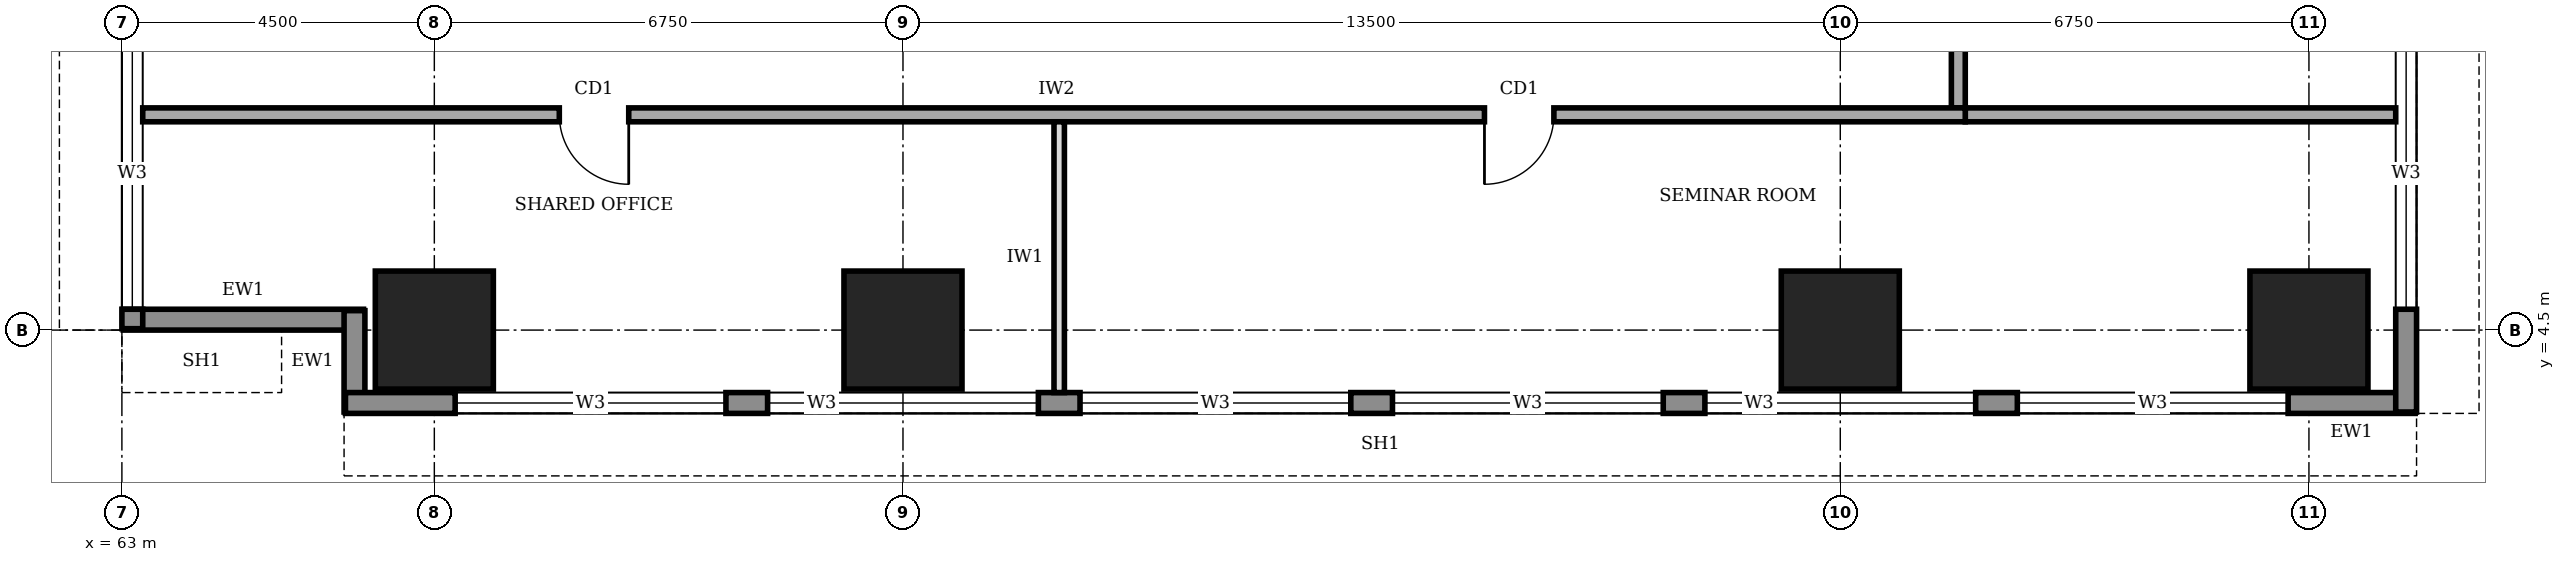
"""IFC4 building model, lengths in metres.
Left out: names, types, materials, properties, quantities, classifications, styles, units other than length and angle.
Written with IfcOpenShell. Run it as: python <this file> out.ifc"""

import sys

from ifc_helpers import new_model, si_unit, direction, frame, frame_2d, origin, origin_2d, place, context, subcontext, project, spatial, rectangle, extrude, element, fill, save


model = new_model("IFC4")
c1 = context("Model", 3, precision=1e-05, world=origin(), true_north=direction((0.0, 1.0)))
c2 = subcontext(c1, "Body", "Model", "MODEL_VIEW")
j1 = project(units=[si_unit("LENGTHUNIT", "METRE"), si_unit("PLANEANGLEUNIT", "RADIAN")], contexts=[c1])
p1 = place(None, origin())
s1 = spatial("IfcSite", under=j1, at=p1, CompositionType="ELEMENT")
p2 = place(p1, origin())
s2 = spatial("IfcBuilding", under=s1, at=p2, CompositionType="ELEMENT")
p3 = place(p2, frame((0.0, 0.0, 93.0)))
s3 = spatial("IfcBuildingStorey", under=s2, at=p3, CompositionType="ELEMENT", Elevation=93.0)
for number, where, z_axis, x_axis in (
    (1, (67.5, 4.5, 0.0), (0.0, 0.0, 1.0), (1.0, 0.0, 0.0)),
    (2, (74.25, 4.5, 0.0), (0.0, 0.0, 1.0), (1.0, 0.0, 0.0)),
    (3, (87.75, 4.5, 0.0), (0.0, 0.0, 1.0), (1.0, 0.0, 0.0)),
    (4, (94.5, 4.5, 0.0), (0.0, 0.0, 1.0), (1.0, 0.0, 0.0)),
):
    element("IfcColumn", number, at=place(p3, frame(where, z_axis=z_axis, x_axis=x_axis)), inside=s3, PredefinedType="COLUMN", context=c2, shape_type="SweptSolid", body=[
        extrude(rectangle(XDim=1.7, YDim=1.7, at=origin_2d()), origin(), (0.0, 0.0, 1.0), 4.0),
    ])
p4 = place(p3, frame((63.02, 4.65, 0.0), z_axis=(0.0, 0.0, 1.0), x_axis=(1.0, 0.0, 0.0)))
e5 = element("IfcWall", 5, at=p4, inside=s3, PredefinedType="STANDARD", context=c2, shape_type="SweptSolid", body=[
    extrude(rectangle(XDim=3.46, YDim=0.3, at=frame_2d((1.73, 0.0))), origin(), (0.0, 0.0, 1.0), 2.85),
])
p5 = place(p3, frame((66.35, 4.78, 0.0), z_axis=(0.0, 0.0, 1.0), x_axis=(0.0, -1.0, 0.0)))
e6 = element("IfcWall", 6, at=p5, inside=s3, PredefinedType="STANDARD", context=c2, shape_type="SweptSolid", body=[
    extrude(rectangle(XDim=1.46, YDim=0.3, at=frame_2d((0.73, 0.0))), origin(), (0.0, 0.0, 1.0), 3.75),
])
p6 = place(p3, frame((66.22, 3.45, 0.0), z_axis=(0.0, 0.0, 1.0), x_axis=(1.0, 0.0, 0.0)))
e7 = element("IfcWall", 7, at=p6, inside=s3, PredefinedType="STANDARD", context=c2, shape_type="SweptSolid", body=[
    extrude(rectangle(XDim=29.81, YDim=0.3, at=frame_2d((14.905, 0.0))), origin(), (0.0, 0.0, 1.0), 3.75),
])
p7 = place(p6, frame((1.58, 0.0, 0.95)))
e8 = element("IfcOpeningElement", 8, at=p7, cuts=e7, PredefinedType="OPENING", context=c2, shape_type="SweptSolid", body=[
    extrude(rectangle(XDim=3.9, YDim=1.8, at=frame_2d((1.95, 0.9))), frame((0.0, 0.16, 0.0), z_axis=(0.0, -1.0, 0.0), x_axis=(1.0, 0.0, 0.0)), (0.0, 0.0, 1.0), 0.32),
])
p8 = place(p6, frame((6.08, 0.0, 0.95)))
e9 = element("IfcOpeningElement", 9, at=p8, cuts=e7, PredefinedType="OPENING", context=c2, shape_type="SweptSolid", body=[
    extrude(rectangle(XDim=3.9, YDim=1.8, at=frame_2d((1.95, 0.9))), frame((0.0, 0.16, 0.0), z_axis=(0.0, -1.0, 0.0), x_axis=(1.0, 0.0, 0.0)), (0.0, 0.0, 1.0), 0.32),
])
p9 = place(p6, frame((10.58, 0.0, 0.95)))
e10 = element("IfcOpeningElement", 10, at=p9, cuts=e7, PredefinedType="OPENING", context=c2, shape_type="SweptSolid", body=[
    extrude(rectangle(XDim=3.9, YDim=1.8, at=frame_2d((1.95, 0.9))), frame((0.0, 0.16, 0.0), z_axis=(0.0, -1.0, 0.0), x_axis=(1.0, 0.0, 0.0)), (0.0, 0.0, 1.0), 0.32),
])
p10 = place(p6, frame((15.08, 0.0, 0.95)))
e11 = element("IfcOpeningElement", 11, at=p10, cuts=e7, PredefinedType="OPENING", context=c2, shape_type="SweptSolid", body=[
    extrude(rectangle(XDim=3.9, YDim=1.8, at=frame_2d((1.95, 0.9))), frame((0.0, 0.16, 0.0), z_axis=(0.0, -1.0, 0.0), x_axis=(1.0, 0.0, 0.0)), (0.0, 0.0, 1.0), 0.32),
])
p11 = place(p6, frame((19.58, 0.0, 0.95)))
e12 = element("IfcOpeningElement", 12, at=p11, cuts=e7, PredefinedType="OPENING", context=c2, shape_type="SweptSolid", body=[
    extrude(rectangle(XDim=3.9, YDim=1.8, at=frame_2d((1.95, 0.9))), frame((0.0, 0.16, 0.0), z_axis=(0.0, -1.0, 0.0), x_axis=(1.0, 0.0, 0.0)), (0.0, 0.0, 1.0), 0.32),
])
p12 = place(p6, frame((24.08, 0.0, 0.95)))
e13 = element("IfcOpeningElement", 13, at=p12, cuts=e7, PredefinedType="OPENING", context=c2, shape_type="SweptSolid", body=[
    extrude(rectangle(XDim=3.9, YDim=1.8, at=frame_2d((1.95, 0.9))), frame((0.0, 0.16, 0.0), z_axis=(0.0, -1.0, 0.0), x_axis=(1.0, 0.0, 0.0)), (0.0, 0.0, 1.0), 0.32),
])
p13 = place(p3, frame((95.9, 3.32, 0.0), z_axis=(0.0, 0.0, 1.0), x_axis=(0.0, 1.0, 0.0)))
e14 = element("IfcWall", 14, at=p13, inside=s3, PredefinedType="STANDARD", context=c2, shape_type="SweptSolid", body=[
    extrude(rectangle(XDim=33.96, YDim=0.3, at=frame_2d((16.98, 0.0))), origin(), (0.0, 0.0, 1.0), 3.75),
])
p14 = place(p13, frame((1.48, 0.0, 0.95)))
e15 = element("IfcOpeningElement", 15, at=p14, cuts=e14, PredefinedType="OPENING", context=c2, shape_type="SweptSolid", body=[
    extrude(rectangle(XDim=3.9, YDim=1.8, at=frame_2d((1.95, 0.9))), frame((0.0, 0.16, 0.0), z_axis=(0.0, -1.0, 0.0), x_axis=(1.0, 0.0, 0.0)), (0.0, 0.0, 1.0), 0.32),
])
p15 = place(p13, frame((5.98, 0.0, 0.95)))
e16 = element("IfcOpeningElement", 16, at=p15, cuts=e14, PredefinedType="OPENING", context=c2, shape_type="SweptSolid", body=[
    extrude(rectangle(XDim=3.9, YDim=1.8, at=frame_2d((1.95, 0.9))), frame((0.0, 0.16, 0.0), z_axis=(0.0, -1.0, 0.0), x_axis=(1.0, 0.0, 0.0)), (0.0, 0.0, 1.0), 0.32),
])
p16 = place(p13, frame((10.48, 0.0, 0.95)))
e17 = element("IfcOpeningElement", 17, at=p16, cuts=e14, PredefinedType="OPENING", context=c2, shape_type="SweptSolid", body=[
    extrude(rectangle(XDim=3.9, YDim=1.8, at=frame_2d((1.95, 0.9))), frame((0.0, 0.16, 0.0), z_axis=(0.0, -1.0, 0.0), x_axis=(1.0, 0.0, 0.0)), (0.0, 0.0, 1.0), 0.32),
])
p17 = place(p13, frame((14.98, 0.0, 0.95)))
e18 = element("IfcOpeningElement", 18, at=p17, cuts=e14, PredefinedType="OPENING", context=c2, shape_type="SweptSolid", body=[
    extrude(rectangle(XDim=3.9, YDim=1.8, at=frame_2d((1.95, 0.9))), frame((0.0, 0.16, 0.0), z_axis=(0.0, -1.0, 0.0), x_axis=(1.0, 0.0, 0.0)), (0.0, 0.0, 1.0), 0.32),
])
p18 = place(p13, frame((19.48, 0.0, 0.95)))
e19 = element("IfcOpeningElement", 19, at=p18, cuts=e14, PredefinedType="OPENING", context=c2, shape_type="SweptSolid", body=[
    extrude(rectangle(XDim=3.9, YDim=1.8, at=frame_2d((1.95, 0.9))), frame((0.0, 0.16, 0.0), z_axis=(0.0, -1.0, 0.0), x_axis=(1.0, 0.0, 0.0)), (0.0, 0.0, 1.0), 0.32),
])
p19 = place(p13, frame((23.98, 0.0, 0.95)))
e20 = element("IfcOpeningElement", 20, at=p19, cuts=e14, PredefinedType="OPENING", context=c2, shape_type="SweptSolid", body=[
    extrude(rectangle(XDim=3.9, YDim=1.8, at=frame_2d((1.95, 0.9))), frame((0.0, 0.16, 0.0), z_axis=(0.0, -1.0, 0.0), x_axis=(1.0, 0.0, 0.0)), (0.0, 0.0, 1.0), 0.32),
])
p20 = place(p13, frame((28.48, 0.0, 0.95)))
e21 = element("IfcOpeningElement", 21, at=p20, cuts=e14, PredefinedType="OPENING", context=c2, shape_type="SweptSolid", body=[
    extrude(rectangle(XDim=3.9, YDim=1.8, at=frame_2d((1.95, 0.9))), frame((0.0, 0.16, 0.0), z_axis=(0.0, -1.0, 0.0), x_axis=(1.0, 0.0, 0.0)), (0.0, 0.0, 1.0), 0.32),
])
p21 = place(p3, frame((63.15, 35.98, 0.0), z_axis=(0.0, 0.0, 1.0), x_axis=(0.0, -1.0, 0.0)))
e22 = element("IfcWall", 22, at=p21, inside=s3, PredefinedType="STANDARD", context=c2, shape_type="SweptSolid", body=[
    extrude(rectangle(XDim=31.46, YDim=0.3, at=frame_2d((15.73, 0.0))), origin(), (0.0, 0.0, 1.0), 3.75),
])
p22 = place(p21, frame((27.28, 0.0, 0.95)))
e23 = element("IfcOpeningElement", 23, at=p22, cuts=e22, PredefinedType="OPENING", context=c2, shape_type="SweptSolid", body=[
    extrude(rectangle(XDim=3.9, YDim=1.8, at=frame_2d((1.95, 0.9))), frame((0.0, 0.16, 0.0), z_axis=(0.0, -1.0, 0.0), x_axis=(1.0, 0.0, 0.0)), (0.0, 0.0, 1.0), 0.32),
])
p23 = place(p21, frame((22.78, 0.0, 0.95)))
e24 = element("IfcOpeningElement", 24, at=p23, cuts=e22, PredefinedType="OPENING", context=c2, shape_type="SweptSolid", body=[
    extrude(rectangle(XDim=3.9, YDim=1.8, at=frame_2d((1.95, 0.9))), frame((0.0, 0.16, 0.0), z_axis=(0.0, -1.0, 0.0), x_axis=(1.0, 0.0, 0.0)), (0.0, 0.0, 1.0), 0.32),
])
p24 = place(p21, frame((18.28, 0.0, 0.95)))
e25 = element("IfcOpeningElement", 25, at=p24, cuts=e22, PredefinedType="OPENING", context=c2, shape_type="SweptSolid", body=[
    extrude(rectangle(XDim=3.9, YDim=1.8, at=frame_2d((1.95, 0.9))), frame((0.0, 0.16, 0.0), z_axis=(0.0, -1.0, 0.0), x_axis=(1.0, 0.0, 0.0)), (0.0, 0.0, 1.0), 0.32),
])
p25 = place(p21, frame((13.78, 0.0, 0.95)))
e26 = element("IfcOpeningElement", 26, at=p25, cuts=e22, PredefinedType="OPENING", context=c2, shape_type="SweptSolid", body=[
    extrude(rectangle(XDim=3.9, YDim=1.8, at=frame_2d((1.95, 0.9))), frame((0.0, 0.16, 0.0), z_axis=(0.0, -1.0, 0.0), x_axis=(1.0, 0.0, 0.0)), (0.0, 0.0, 1.0), 0.32),
])
p26 = place(p21, frame((9.28, 0.0, 0.95)))
e27 = element("IfcOpeningElement", 27, at=p26, cuts=e22, PredefinedType="OPENING", context=c2, shape_type="SweptSolid", body=[
    extrude(rectangle(XDim=3.9, YDim=1.8, at=frame_2d((1.95, 0.9))), frame((0.0, 0.16, 0.0), z_axis=(0.0, -1.0, 0.0), x_axis=(1.0, 0.0, 0.0)), (0.0, 0.0, 1.0), 0.32),
])
p27 = place(p21, frame((4.78, 0.0, 0.95)))
e28 = element("IfcOpeningElement", 28, at=p27, cuts=e22, PredefinedType="OPENING", context=c2, shape_type="SweptSolid", body=[
    extrude(rectangle(XDim=3.9, YDim=1.8, at=frame_2d((1.95, 0.9))), frame((0.0, 0.16, 0.0), z_axis=(0.0, -1.0, 0.0), x_axis=(1.0, 0.0, 0.0)), (0.0, 0.0, 1.0), 0.32),
])
p28 = place(p3, frame((63.3, 7.6, 0.0), z_axis=(0.0, 0.0, 1.0), x_axis=(1.0, 0.0, 0.0)))
e29 = element("IfcWall", 29, at=p28, inside=s3, PredefinedType="SOLIDWALL", context=c2, shape_type="SweptSolid", body=[
    extrude(rectangle(XDim=26.25, YDim=0.2, at=frame_2d((13.125, 0.0))), origin(), (0.0, 0.0, 1.0), 3.75),
])
p29 = place(p28, frame((6.0, 0.0, 0.0)))
e30 = element("IfcOpeningElement", 30, at=p29, cuts=e29, PredefinedType="OPENING", context=c2, shape_type="SweptSolid", body=[
    extrude(rectangle(XDim=1.0, YDim=2.1, at=frame_2d((0.5, 1.05))), frame((0.0, 0.11, 0.0), z_axis=(0.0, -1.0, 0.0), x_axis=(1.0, 0.0, 0.0)), (0.0, 0.0, 1.0), 0.22),
])
p30 = place(p28, frame((19.325, 0.0, 0.0)))
e31 = element("IfcOpeningElement", 31, at=p30, cuts=e29, PredefinedType="OPENING", context=c2, shape_type="SweptSolid", body=[
    extrude(rectangle(XDim=1.0, YDim=2.1, at=frame_2d((0.5, 1.05))), frame((0.0, 0.11, 0.0), z_axis=(0.0, -1.0, 0.0), x_axis=(1.0, 0.0, 0.0)), (0.0, 0.0, 1.0), 0.22),
])
p31 = place(p3, frame((89.45, 7.7, 0.0), z_axis=(0.0, 0.0, 1.0), x_axis=(0.0, 1.0, 0.0)))
e32 = element("IfcWall", 32, at=p31, inside=s3, PredefinedType="SOLIDWALL", context=c2, shape_type="SweptSolid", body=[
    extrude(rectangle(XDim=25.3, YDim=0.2, at=frame_2d((12.65, 0.0))), origin(), (0.0, 0.0, 1.0), 3.75),
])
p32 = place(p31, frame((2.3, 0.0, 0.0)))
e33 = element("IfcOpeningElement", 33, at=p32, cuts=e32, PredefinedType="OPENING", context=c2, shape_type="SweptSolid", body=[
    extrude(rectangle(XDim=1.0, YDim=2.1, at=frame_2d((0.5, 1.05))), frame((0.0, 0.11, 0.0), z_axis=(0.0, -1.0, 0.0), x_axis=(1.0, 0.0, 0.0)), (0.0, 0.0, 1.0), 0.22),
])
p33 = place(p31, frame((7.25, 0.0, 0.0)))
e34 = element("IfcOpeningElement", 34, at=p33, cuts=e32, PredefinedType="OPENING", context=c2, shape_type="SweptSolid", body=[
    extrude(rectangle(XDim=0.9, YDim=2.1, at=frame_2d((0.45, 1.05))), frame((0.0, 0.11, 0.0), z_axis=(0.0, -1.0, 0.0), x_axis=(1.0, 0.0, 0.0)), (0.0, 0.0, 1.0), 0.22),
])
p34 = place(p31, frame((10.25, 0.0, 0.0)))
e35 = element("IfcOpeningElement", 35, at=p34, cuts=e32, PredefinedType="OPENING", context=c2, shape_type="SweptSolid", body=[
    extrude(rectangle(XDim=0.9, YDim=2.1, at=frame_2d((0.45, 1.05))), frame((0.0, 0.11, 0.0), z_axis=(0.0, -1.0, 0.0), x_axis=(1.0, 0.0, 0.0)), (0.0, 0.0, 1.0), 0.22),
])
p35 = place(p31, frame((15.1, 0.0, 0.0)))
e36 = element("IfcOpeningElement", 36, at=p35, cuts=e32, PredefinedType="OPENING", context=c2, shape_type="SweptSolid", body=[
    extrude(rectangle(XDim=0.9, YDim=2.1, at=frame_2d((0.45, 1.05))), frame((0.0, 0.11, 0.0), z_axis=(0.0, -1.0, 0.0), x_axis=(1.0, 0.0, 0.0)), (0.0, 0.0, 1.0), 0.22),
])
p36 = place(p31, frame((17.8, 0.0, 0.0)))
e37 = element("IfcOpeningElement", 37, at=p36, cuts=e32, PredefinedType="OPENING", context=c2, shape_type="SweptSolid", body=[
    extrude(rectangle(XDim=1.0, YDim=2.1, at=frame_2d((0.5, 1.05))), frame((0.0, 0.11, 0.0), z_axis=(0.0, -1.0, 0.0), x_axis=(1.0, 0.0, 0.0)), (0.0, 0.0, 1.0), 0.22),
])
p37 = place(p31, frame((12.3, 0.0, 0.0)))
e38 = element("IfcOpeningElement", 38, at=p37, cuts=e32, PredefinedType="OPENING", context=c2, shape_type="SweptSolid", body=[
    extrude(rectangle(XDim=1.0, YDim=2.1, at=frame_2d((0.5, 1.05))), frame((0.0, 0.11, 0.0), z_axis=(0.0, -1.0, 0.0), x_axis=(1.0, 0.0, 0.0)), (0.0, 0.0, 1.0), 0.22),
])
p38 = place(p31, frame((21.8, 0.0, 0.0)))
e39 = element("IfcOpeningElement", 39, at=p38, cuts=e32, PredefinedType="OPENING", context=c2, shape_type="SweptSolid", body=[
    extrude(rectangle(XDim=1.0, YDim=2.1, at=frame_2d((0.5, 1.05))), frame((0.0, 0.11, 0.0), z_axis=(0.0, -1.0, 0.0), x_axis=(1.0, 0.0, 0.0)), (0.0, 0.0, 1.0), 0.22),
])
p39 = place(p3, frame((89.55, 7.6, 0.0), z_axis=(0.0, 0.0, 1.0), x_axis=(1.0, 0.0, 0.0)))
e40 = element("IfcWall", 40, at=p39, inside=s3, PredefinedType="SOLIDWALL", context=c2, shape_type="SweptSolid", body=[
    extrude(rectangle(XDim=6.2, YDim=0.2, at=frame_2d((3.1, 0.0))), origin(), (0.0, 0.0, 1.0), 3.75),
])
p40 = place(p3, frame((76.5, 3.6, 0.0), z_axis=(0.0, 0.0, 1.0), x_axis=(0.0, 1.0, 0.0)))
e41 = element("IfcWall", 41, at=p40, inside=s3, PredefinedType="PARTITIONING", context=c2, shape_type="SweptSolid", body=[
    extrude(rectangle(XDim=3.9, YDim=0.15, at=frame_2d((1.95, 0.0))), origin(), (0.0, 0.0, 1.0), 3.75),
])
p41 = place(p7, origin())
e42 = element("IfcWindow", 42, at=p41, inside=s3, PartitioningType="SINGLE_PANEL", PredefinedType="WINDOW", context=c2, shape_type="SweptSolid", body=[
    extrude(rectangle(XDim=3.9, YDim=1.8, at=frame_2d((1.95, 0.9))), frame((0.0, 0.03, 0.0), z_axis=(0.0, -1.0, 0.0), x_axis=(1.0, 0.0, 0.0)), (0.0, 0.0, 1.0), 0.06),
])
fill(e8, e42)
p42 = place(p8, origin())
e43 = element("IfcWindow", 43, at=p42, inside=s3, PartitioningType="SINGLE_PANEL", PredefinedType="WINDOW", context=c2, shape_type="SweptSolid", body=[
    extrude(rectangle(XDim=3.9, YDim=1.8, at=frame_2d((1.95, 0.9))), frame((0.0, 0.03, 0.0), z_axis=(0.0, -1.0, 0.0), x_axis=(1.0, 0.0, 0.0)), (0.0, 0.0, 1.0), 0.06),
])
fill(e9, e43)
p43 = place(p9, origin())
e44 = element("IfcWindow", 44, at=p43, inside=s3, PartitioningType="SINGLE_PANEL", PredefinedType="WINDOW", context=c2, shape_type="SweptSolid", body=[
    extrude(rectangle(XDim=3.9, YDim=1.8, at=frame_2d((1.95, 0.9))), frame((0.0, 0.03, 0.0), z_axis=(0.0, -1.0, 0.0), x_axis=(1.0, 0.0, 0.0)), (0.0, 0.0, 1.0), 0.06),
])
fill(e10, e44)
p44 = place(p10, origin())
e45 = element("IfcWindow", 45, at=p44, inside=s3, PartitioningType="SINGLE_PANEL", PredefinedType="WINDOW", context=c2, shape_type="SweptSolid", body=[
    extrude(rectangle(XDim=3.9, YDim=1.8, at=frame_2d((1.95, 0.9))), frame((0.0, 0.03, 0.0), z_axis=(0.0, -1.0, 0.0), x_axis=(1.0, 0.0, 0.0)), (0.0, 0.0, 1.0), 0.06),
])
fill(e11, e45)
p45 = place(p11, origin())
e46 = element("IfcWindow", 46, at=p45, inside=s3, PartitioningType="SINGLE_PANEL", PredefinedType="WINDOW", context=c2, shape_type="SweptSolid", body=[
    extrude(rectangle(XDim=3.9, YDim=1.8, at=frame_2d((1.95, 0.9))), frame((0.0, 0.03, 0.0), z_axis=(0.0, -1.0, 0.0), x_axis=(1.0, 0.0, 0.0)), (0.0, 0.0, 1.0), 0.06),
])
fill(e12, e46)
p46 = place(p12, origin())
e47 = element("IfcWindow", 47, at=p46, inside=s3, PartitioningType="SINGLE_PANEL", PredefinedType="WINDOW", context=c2, shape_type="SweptSolid", body=[
    extrude(rectangle(XDim=3.9, YDim=1.8, at=frame_2d((1.95, 0.9))), frame((0.0, 0.03, 0.0), z_axis=(0.0, -1.0, 0.0), x_axis=(1.0, 0.0, 0.0)), (0.0, 0.0, 1.0), 0.06),
])
fill(e13, e47)
p47 = place(p14, origin())
e48 = element("IfcWindow", 48, at=p47, inside=s3, PartitioningType="SINGLE_PANEL", PredefinedType="WINDOW", context=c2, shape_type="SweptSolid", body=[
    extrude(rectangle(XDim=3.9, YDim=1.8, at=frame_2d((1.95, 0.9))), frame((0.0, 0.03, 0.0), z_axis=(0.0, -1.0, 0.0), x_axis=(1.0, 0.0, 0.0)), (0.0, 0.0, 1.0), 0.06),
])
fill(e15, e48)
p48 = place(p22, origin())
e49 = element("IfcWindow", 49, at=p48, inside=s3, PartitioningType="SINGLE_PANEL", PredefinedType="WINDOW", context=c2, shape_type="SweptSolid", body=[
    extrude(rectangle(XDim=3.9, YDim=1.8, at=frame_2d((1.95, 0.9))), frame((0.0, 0.03, 0.0), z_axis=(0.0, -1.0, 0.0), x_axis=(1.0, 0.0, 0.0)), (0.0, 0.0, 1.0), 0.06),
])
fill(e23, e49)
p49 = place(p29, frame((1.0, 0.0, 0.0), z_axis=(0.0, 0.0, 1.0), x_axis=(-1.0, 0.0, 0.0)))
e50 = element("IfcDoor", 50, at=p49, inside=s3, OperationType="SINGLE_SWING_LEFT", PredefinedType="DOOR", context=c2, shape_type="SweptSolid", body=[
    extrude(rectangle(XDim=1.0, YDim=2.1, at=frame_2d((0.5, 1.05))), frame((0.0, 0.025, 0.0), z_axis=(0.0, -1.0, 0.0), x_axis=(1.0, 0.0, 0.0)), (0.0, 0.0, 1.0), 0.05),
])
fill(e30, e50)
p50 = place(p30, frame((1.0, 0.0, 0.0), z_axis=(0.0, 0.0, 1.0), x_axis=(-1.0, 0.0, 0.0)))
e51 = element("IfcDoor", 51, at=p50, inside=s3, OperationType="SINGLE_SWING_RIGHT", PredefinedType="DOOR", context=c2, shape_type="SweptSolid", body=[
    extrude(rectangle(XDim=1.0, YDim=2.1, at=frame_2d((0.5, 1.05))), frame((0.0, 0.025, 0.0), z_axis=(0.0, -1.0, 0.0), x_axis=(1.0, 0.0, 0.0)), (0.0, 0.0, 1.0), 0.05),
])
fill(e31, e51)
save(model, sys.argv[1])
